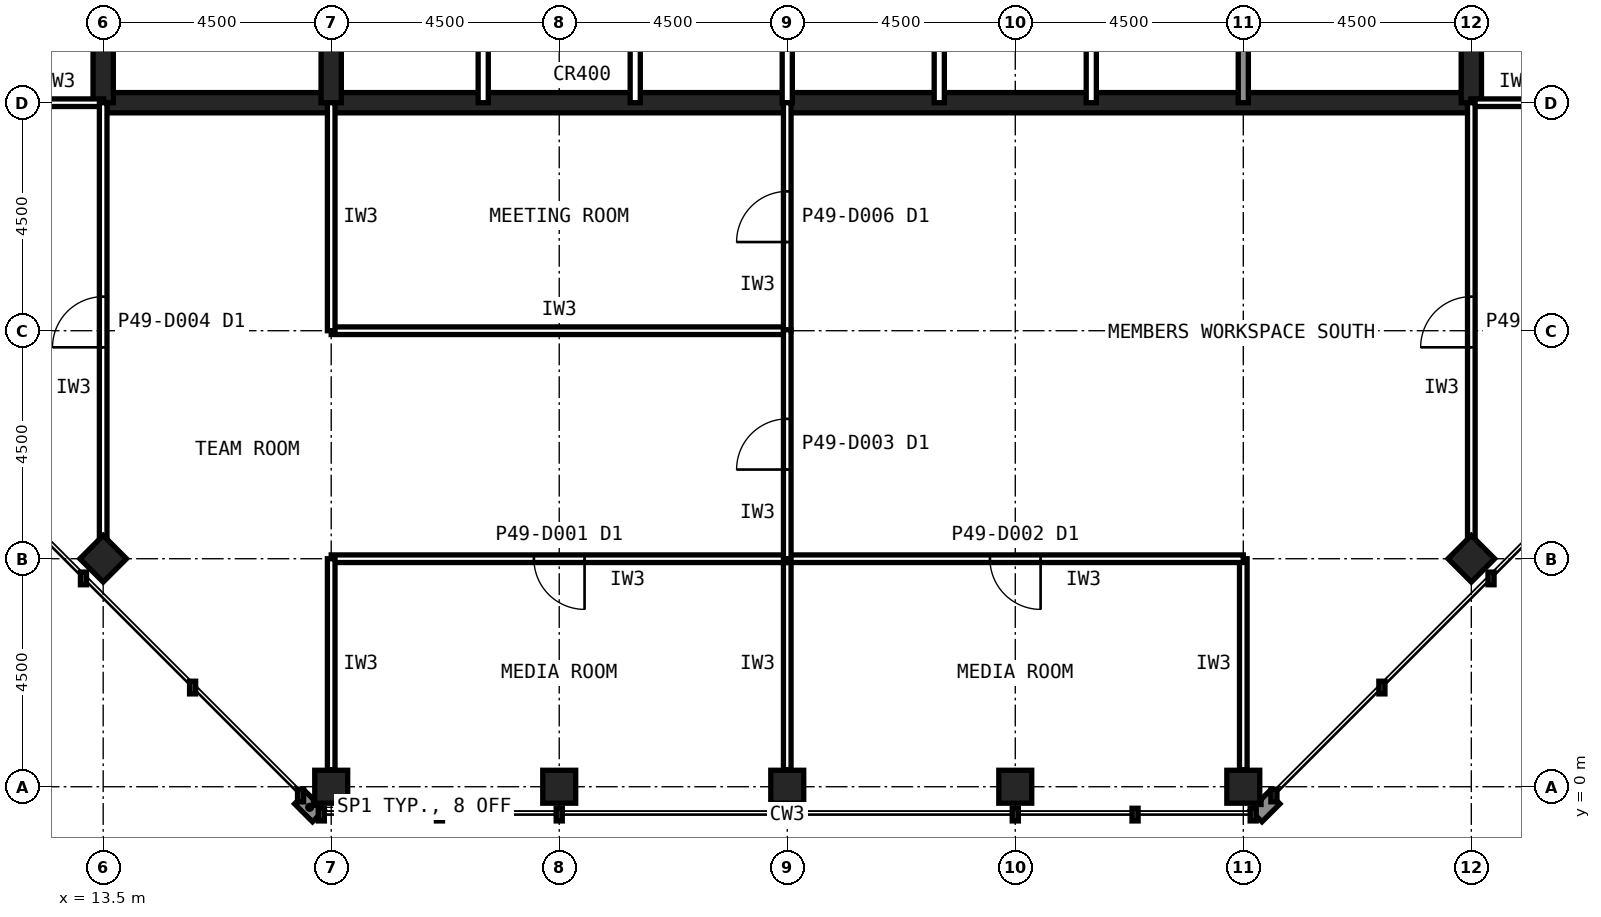
"""IFC4 building model, lengths in metres.
Left out: names, types, materials, properties, quantities, classifications, styles, units other than length and angle.
Written with IfcOpenShell. Run it as: python <this file> out.ifc"""

import sys

from ifc_helpers import new_model, si_unit, direction, frame, frame_2d, origin, origin_2d, place, context, subcontext, project, spatial, rectangle, hollow_rectangle, extrude, element, fill, save


model = new_model("IFC4")
c1 = context("Model", 3, precision=1e-05, world=origin(), true_north=direction((0.0, 1.0)))
c2 = subcontext(c1, "Body", "Model", "MODEL_VIEW")
j1 = project(units=[si_unit("LENGTHUNIT", "METRE"), si_unit("PLANEANGLEUNIT", "RADIAN")], contexts=[c1])
p1 = place(None, origin())
s1 = spatial("IfcSite", under=j1, at=p1, CompositionType="ELEMENT")
p2 = place(p1, origin())
s2 = spatial("IfcBuilding", under=s1, at=p2, CompositionType="ELEMENT")
p3 = place(p2, frame((0.0, 0.0, 210.6)))
s3 = spatial("IfcBuildingStorey", under=s2, at=p3, CompositionType="ELEMENT", Elevation=210.6)
for number, where, z_axis, x_axis in (
    (1, (18.0, 0.0, 0.0), (0.0, 0.0, 1.0), (1.0, 0.0, 0.0)),
    (2, (22.5, 0.0, 0.0), (0.0, 0.0, 1.0), (1.0, 0.0, 0.0)),
    (3, (27.0, 0.0, 0.0), (0.0, 0.0, 1.0), (1.0, 0.0, 0.0)),
    (4, (31.5, 0.0, 0.0), (0.0, 0.0, 1.0), (1.0, 0.0, 0.0)),
    (5, (36.0, 0.0, 0.0), (0.0, 0.0, 1.0), (1.0, 0.0, 0.0)),
    (6, (13.5, 4.5, 0.0), (0.0, 0.0, 1.0), (0.707, 0.707, 0.0)),
    (7, (40.5, 4.5, 0.0), (0.0, 0.0, 1.0), (0.707, 0.707, 0.0)),
):
    element("IfcColumn", number, at=place(p3, frame(where, z_axis=z_axis, x_axis=x_axis)), inside=s3, PredefinedType="COLUMN", context=c2, shape_type="SweptSolid", body=[
        extrude(hollow_rectangle(XDim=0.65, YDim=0.65, WallThickness=0.032, at=origin_2d()), origin(), (0.0, 0.0, 1.0), 4.0),
    ])
p4 = place(p3, frame((13.5, 13.5, 0.0), z_axis=(0.0, 0.0, 1.0), x_axis=(1.0, 0.0, 0.0)))
e8 = element("IfcWall", 8, at=p4, inside=s3, PredefinedType="SHEAR", context=c2, shape_type="SweptSolid", body=[
    extrude(rectangle(XDim=27.0, YDim=0.4, at=frame_2d((13.5, 0.0))), origin(), (0.0, 0.0, 1.0), 4.0),
])
p5 = place(p3, frame((40.5, 13.5, 0.0), z_axis=(0.0, 0.0, 1.0), x_axis=(0.0, 1.0, 0.0)))
e9 = element("IfcWall", 9, at=p5, inside=s3, PredefinedType="SHEAR", context=c2, shape_type="SweptSolid", body=[
    extrude(rectangle(XDim=27.0, YDim=0.4, at=frame_2d((13.5, 0.0))), origin(), (0.0, 0.0, 1.0), 4.0),
])
p6 = place(p5, frame((5.85, 0.0, 0.0)))
e10 = element("IfcOpeningElement", 10, at=p6, cuts=e9, PredefinedType="OPENING", context=c2, shape_type="SweptSolid", body=[
    extrude(rectangle(XDim=1.8, YDim=2.1, at=frame_2d((0.9, 1.05))), frame((0.0, 0.21, 0.0), z_axis=(0.0, -1.0, 0.0), x_axis=(1.0, 0.0, 0.0)), (0.0, 0.0, 1.0), 0.42),
])
p7 = place(p5, frame((19.65, 0.0, 0.0)))
e11 = element("IfcOpeningElement", 11, at=p7, cuts=e9, PredefinedType="OPENING", context=c2, shape_type="SweptSolid", body=[
    extrude(rectangle(XDim=1.2, YDim=2.1, at=frame_2d((0.6, 1.05))), frame((0.0, 0.21, 0.0), z_axis=(0.0, -1.0, 0.0), x_axis=(1.0, 0.0, 0.0)), (0.0, 0.0, 1.0), 0.42),
])
p8 = place(p3, frame((13.5, 40.5, 0.0), z_axis=(0.0, 0.0, 1.0), x_axis=(0.0, -1.0, 0.0)))
e12 = element("IfcWall", 12, at=p8, inside=s3, PredefinedType="SHEAR", context=c2, shape_type="SweptSolid", body=[
    extrude(rectangle(XDim=27.0, YDim=0.4, at=frame_2d((13.5, 0.0))), origin(), (0.0, 0.0, 1.0), 4.0),
])
p9 = place(p8, frame((19.65, 0.0, 0.0)))
e13 = element("IfcOpeningElement", 13, at=p9, cuts=e12, PredefinedType="OPENING", context=c2, shape_type="SweptSolid", body=[
    extrude(rectangle(XDim=1.2, YDim=2.1, at=frame_2d((0.6, 1.05))), frame((0.0, 0.21, 0.0), z_axis=(0.0, -1.0, 0.0), x_axis=(1.0, 0.0, 0.0)), (0.0, 0.0, 1.0), 0.42),
])
p10 = place(p8, frame((5.85, 0.0, 0.0)))
e14 = element("IfcOpeningElement", 14, at=p10, cuts=e12, PredefinedType="OPENING", context=c2, shape_type="SweptSolid", body=[
    extrude(rectangle(XDim=1.8, YDim=2.1, at=frame_2d((0.9, 1.05))), frame((0.0, 0.21, 0.0), z_axis=(0.0, -1.0, 0.0), x_axis=(1.0, 0.0, 0.0)), (0.0, 0.0, 1.0), 0.42),
])
p11 = place(p3, frame((18.0, 13.5, 0.0), z_axis=(0.0, 0.0, 1.0), x_axis=(0.0, 1.0, 0.0)))
e15 = element("IfcWall", 15, at=p11, inside=s3, PredefinedType="SHEAR", context=c2, shape_type="SweptSolid", body=[
    extrude(rectangle(XDim=18.0, YDim=0.4, at=frame_2d((9.0, 0.0))), origin(), (0.0, 0.0, 1.0), 4.0),
])
p12 = place(p3, frame((36.0, 13.5, 0.0), z_axis=(0.0, 0.0, 1.0), x_axis=(0.0, 1.0, 0.0)))
e16 = element("IfcWall", 16, at=p12, inside=s3, PredefinedType="SOLIDWALL", context=c2, shape_type="SweptSolid", body=[
    extrude(rectangle(XDim=4.5, YDim=0.2, at=frame_2d((2.25, 0.0))), origin(), (0.0, 0.0, 1.0), 3.84),
])
for number, where, z_axis, x_axis in (
    (17, (21.0, 13.5, 0.0), (0.0, 0.0, 1.0), (0.0, 1.0, 0.0)),
    (18, (24.0, 13.5, 0.0), (0.0, 0.0, 1.0), (0.0, 1.0, 0.0)),
    (19, (27.0, 13.5, 0.0), (0.0, 0.0, 1.0), (0.0, 1.0, 0.0)),
    (20, (30.0, 13.5, 0.0), (0.0, 0.0, 1.0), (0.0, 1.0, 0.0)),
    (21, (33.0, 13.5, 0.0), (0.0, 0.0, 1.0), (0.0, 1.0, 0.0)),
):
    element("IfcWall", number, at=place(p3, frame(where, z_axis=z_axis, x_axis=x_axis)), inside=s3, PredefinedType="PARTITIONING", context=c2, shape_type="SweptSolid", body=[
        extrude(rectangle(XDim=4.5, YDim=0.2, at=frame_2d((2.25, 0.0))), origin(), (0.0, 0.0, 1.0), 3.84),
    ])
for number, where, z_axis, x_axis in (
    (22, (11.7, 13.5, 0.0), (0.0, 0.0, 1.0), (1.0, 0.0, 0.0)),
    (23, (40.49, 13.5, 0.0), (0.0, 0.0, 1.0), (1.0, 0.0, 0.0)),
):
    element("IfcWall", number, at=place(p3, frame(where, z_axis=z_axis, x_axis=x_axis)), inside=s3, PredefinedType="PARTITIONING", context=c2, shape_type="SweptSolid", body=[
        extrude(rectangle(XDim=1.81, YDim=0.15, at=frame_2d((0.905, 0.0))), origin(), (0.0, 0.0, 1.0), 2.989),
    ])
p13 = place(p3, frame((18.0, 9.0, 0.0), z_axis=(0.0, 0.0, 1.0), x_axis=(1.0, 0.0, 0.0)))
e24 = element("IfcWall", 24, at=p13, inside=s3, PredefinedType="PARTITIONING", context=c2, shape_type="SweptSolid", body=[
    extrude(rectangle(XDim=9.0, YDim=0.15, at=frame_2d((4.5, 0.0))), origin(), (0.0, 0.0, 1.0), 3.84),
])
p14 = place(p3, frame((27.0, 9.0, 0.0), z_axis=(0.0, 0.0, 1.0), x_axis=(0.0, 1.0, 0.0)))
e25 = element("IfcWall", 25, at=p14, inside=s3, PredefinedType="PARTITIONING", context=c2, shape_type="SweptSolid", body=[
    extrude(rectangle(XDim=4.5, YDim=0.15, at=frame_2d((2.25, 0.0))), origin(), (0.0, 0.0, 1.0), 2.989),
])
p15 = place(p14, frame((1.75, 0.0, 0.0)))
e26 = element("IfcOpeningElement", 26, at=p15, cuts=e25, PredefinedType="OPENING", context=c2, shape_type="SweptSolid", body=[
    extrude(rectangle(XDim=1.0, YDim=2.1, at=frame_2d((0.5, 1.05))), frame((0.0, 0.085, 0.0), z_axis=(0.0, -1.0, 0.0), x_axis=(1.0, 0.0, 0.0)), (0.0, 0.0, 1.0), 0.17),
])
p16 = place(p3, frame((18.0, 13.5, 0.0), z_axis=(0.0, 0.0, 1.0), x_axis=(0.0, -1.0, 0.0)))
e27 = element("IfcWall", 27, at=p16, inside=s3, PredefinedType="PARTITIONING", context=c2, shape_type="SweptSolid", body=[
    extrude(rectangle(XDim=4.5, YDim=0.15, at=frame_2d((2.25, 0.0))), origin(), (0.0, 0.0, 1.0), 2.989),
])
p17 = place(p3, frame((27.0, 0.335, 0.0), z_axis=(0.0, 0.0, 1.0), x_axis=(0.0, 1.0, 0.0)))
e28 = element("IfcWall", 28, at=p17, inside=s3, PredefinedType="PARTITIONING", context=c2, shape_type="SweptSolid", body=[
    extrude(rectangle(XDim=4.165, YDim=0.15, at=frame_2d((2.083, 0.0))), origin(), (0.0, 0.0, 1.0), 2.989),
])
p18 = place(p3, frame((27.0, 4.5, 0.0), z_axis=(0.0, 0.0, 1.0), x_axis=(-1.0, 0.0, 0.0)))
e29 = element("IfcWall", 29, at=p18, inside=s3, PredefinedType="PARTITIONING", context=c2, shape_type="SweptSolid", body=[
    extrude(rectangle(XDim=9.0, YDim=0.15, at=frame_2d((4.5, 0.0))), origin(), (0.0, 0.0, 1.0), 3.84),
])
p19 = place(p18, frame((4.0, 0.0, 0.0)))
e30 = element("IfcOpeningElement", 30, at=p19, cuts=e29, PredefinedType="OPENING", context=c2, shape_type="SweptSolid", body=[
    extrude(rectangle(XDim=1.0, YDim=2.1, at=frame_2d((0.5, 1.05))), frame((0.0, 0.085, 0.0), z_axis=(0.0, -1.0, 0.0), x_axis=(1.0, 0.0, 0.0)), (0.0, 0.0, 1.0), 0.17),
])
for number, where, z_axis, x_axis in (
    (31, (18.0, 4.5, 0.0), (0.0, 0.0, 1.0), (0.0, -1.0, 0.0)),
    (32, (36.0, 0.335, 0.0), (0.0, 0.0, 1.0), (0.0, 1.0, 0.0)),
):
    element("IfcWall", number, at=place(p3, frame(where, z_axis=z_axis, x_axis=x_axis)), inside=s3, PredefinedType="PARTITIONING", context=c2, shape_type="SweptSolid", body=[
        extrude(rectangle(XDim=4.165, YDim=0.15, at=frame_2d((2.083, 0.0))), origin(), (0.0, 0.0, 1.0), 2.989),
    ])
p20 = place(p3, frame((36.0, 4.5, 0.0), z_axis=(0.0, 0.0, 1.0), x_axis=(-1.0, 0.0, 0.0)))
e33 = element("IfcWall", 33, at=p20, inside=s3, PredefinedType="PARTITIONING", context=c2, shape_type="SweptSolid", body=[
    extrude(rectangle(XDim=9.0, YDim=0.15, at=frame_2d((4.5, 0.0))), origin(), (0.0, 0.0, 1.0), 3.84),
])
p21 = place(p20, frame((4.0, 0.0, 0.0)))
e34 = element("IfcOpeningElement", 34, at=p21, cuts=e33, PredefinedType="OPENING", context=c2, shape_type="SweptSolid", body=[
    extrude(rectangle(XDim=1.0, YDim=2.1, at=frame_2d((0.5, 1.05))), frame((0.0, 0.085, 0.0), z_axis=(0.0, -1.0, 0.0), x_axis=(1.0, 0.0, 0.0)), (0.0, 0.0, 1.0), 0.17),
])
p22 = place(p3, frame((40.5, 4.845, 0.0), z_axis=(0.0, 0.0, 1.0), x_axis=(0.0, 1.0, 0.0)))
e35 = element("IfcWall", 35, at=p22, inside=s3, PredefinedType="PARTITIONING", context=c2, shape_type="SweptSolid", body=[
    extrude(rectangle(XDim=8.655, YDim=0.15, at=frame_2d((4.328, 0.0))), origin(), (0.0, 0.0, 1.0), 2.989),
])
p23 = place(p22, frame((3.827, 0.0, 0.0)))
e36 = element("IfcOpeningElement", 36, at=p23, cuts=e35, PredefinedType="OPENING", context=c2, shape_type="SweptSolid", body=[
    extrude(rectangle(XDim=1.0, YDim=2.1, at=frame_2d((0.5, 1.05))), frame((0.0, 0.085, 0.0), z_axis=(0.0, -1.0, 0.0), x_axis=(1.0, 0.0, 0.0)), (0.0, 0.0, 1.0), 0.17),
])
p24 = place(p3, frame((27.0, 4.5, 0.0), z_axis=(0.0, 0.0, 1.0), x_axis=(0.0, 1.0, 0.0)))
e37 = element("IfcWall", 37, at=p24, inside=s3, PredefinedType="PARTITIONING", context=c2, shape_type="SweptSolid", body=[
    extrude(rectangle(XDim=4.52, YDim=0.15, at=frame_2d((2.26, 0.0))), origin(), (0.0, 0.0, 1.0), 2.989),
])
p25 = place(p24, frame((1.76, 0.0, 0.0)))
e38 = element("IfcOpeningElement", 38, at=p25, cuts=e37, PredefinedType="OPENING", context=c2, shape_type="SweptSolid", body=[
    extrude(rectangle(XDim=1.0, YDim=2.1, at=frame_2d((0.5, 1.05))), frame((0.0, 0.085, 0.0), z_axis=(0.0, -1.0, 0.0), x_axis=(1.0, 0.0, 0.0)), (0.0, 0.0, 1.0), 0.17),
])
p26 = place(p3, frame((13.5, 4.845, 0.0), z_axis=(0.0, 0.0, 1.0), x_axis=(0.0, 1.0, 0.0)))
e39 = element("IfcWall", 39, at=p26, inside=s3, PredefinedType="PARTITIONING", context=c2, shape_type="SweptSolid", body=[
    extrude(rectangle(XDim=8.655, YDim=0.15, at=frame_2d((4.328, 0.0))), origin(), (0.0, 0.0, 1.0), 2.989),
])
p27 = place(p26, frame((3.827, 0.0, 0.0)))
e40 = element("IfcOpeningElement", 40, at=p27, cuts=e39, PredefinedType="OPENING", context=c2, shape_type="SweptSolid", body=[
    extrude(rectangle(XDim=1.0, YDim=2.1, at=frame_2d((0.5, 1.05))), frame((0.0, 0.085, 0.0), z_axis=(0.0, -1.0, 0.0), x_axis=(1.0, 0.0, 0.0)), (0.0, 0.0, 1.0), 0.17),
])
p28 = place(p15, origin())
e41 = element("IfcDoor", 41, at=p28, inside=s3, OperationType="SINGLE_SWING_LEFT", PredefinedType="DOOR", context=c2, shape_type="SweptSolid", body=[
    extrude(rectangle(XDim=1.0, YDim=2.1, at=frame_2d((0.5, 1.05))), frame((0.0, 0.025, 0.0), z_axis=(0.0, -1.0, 0.0), x_axis=(1.0, 0.0, 0.0)), (0.0, 0.0, 1.0), 0.05),
])
fill(e26, e41)
p29 = place(p19, origin())
e42 = element("IfcDoor", 42, at=p29, inside=s3, OperationType="SINGLE_SWING_LEFT", PredefinedType="DOOR", context=c2, shape_type="SweptSolid", body=[
    extrude(rectangle(XDim=1.0, YDim=2.1, at=frame_2d((0.5, 1.05))), frame((0.0, 0.025, 0.0), z_axis=(0.0, -1.0, 0.0), x_axis=(1.0, 0.0, 0.0)), (0.0, 0.0, 1.0), 0.05),
])
fill(e30, e42)
p30 = place(p21, origin())
e43 = element("IfcDoor", 43, at=p30, inside=s3, OperationType="SINGLE_SWING_LEFT", PredefinedType="DOOR", context=c2, shape_type="SweptSolid", body=[
    extrude(rectangle(XDim=1.0, YDim=2.1, at=frame_2d((0.5, 1.05))), frame((0.0, 0.025, 0.0), z_axis=(0.0, -1.0, 0.0), x_axis=(1.0, 0.0, 0.0)), (0.0, 0.0, 1.0), 0.05),
])
fill(e34, e43)
p31 = place(p23, origin())
e44 = element("IfcDoor", 44, at=p31, inside=s3, OperationType="SINGLE_SWING_LEFT", PredefinedType="DOOR", context=c2, shape_type="SweptSolid", body=[
    extrude(rectangle(XDim=1.0, YDim=2.1, at=frame_2d((0.5, 1.05))), frame((0.0, 0.025, 0.0), z_axis=(0.0, -1.0, 0.0), x_axis=(1.0, 0.0, 0.0)), (0.0, 0.0, 1.0), 0.05),
])
fill(e36, e44)
p32 = place(p25, origin())
e45 = element("IfcDoor", 45, at=p32, inside=s3, OperationType="SINGLE_SWING_LEFT", PredefinedType="DOOR", context=c2, shape_type="SweptSolid", body=[
    extrude(rectangle(XDim=1.0, YDim=2.1, at=frame_2d((0.5, 1.05))), frame((0.0, 0.025, 0.0), z_axis=(0.0, -1.0, 0.0), x_axis=(1.0, 0.0, 0.0)), (0.0, 0.0, 1.0), 0.05),
])
fill(e38, e45)
p33 = place(p27, origin())
e46 = element("IfcDoor", 46, at=p33, inside=s3, OperationType="SINGLE_SWING_LEFT", PredefinedType="DOOR", context=c2, shape_type="SweptSolid", body=[
    extrude(rectangle(XDim=1.0, YDim=2.1, at=frame_2d((0.5, 1.05))), frame((0.0, 0.025, 0.0), z_axis=(0.0, -1.0, 0.0), x_axis=(1.0, 0.0, 0.0)), (0.0, 0.0, 1.0), 0.05),
])
fill(e40, e46)
save(model, sys.argv[1])
